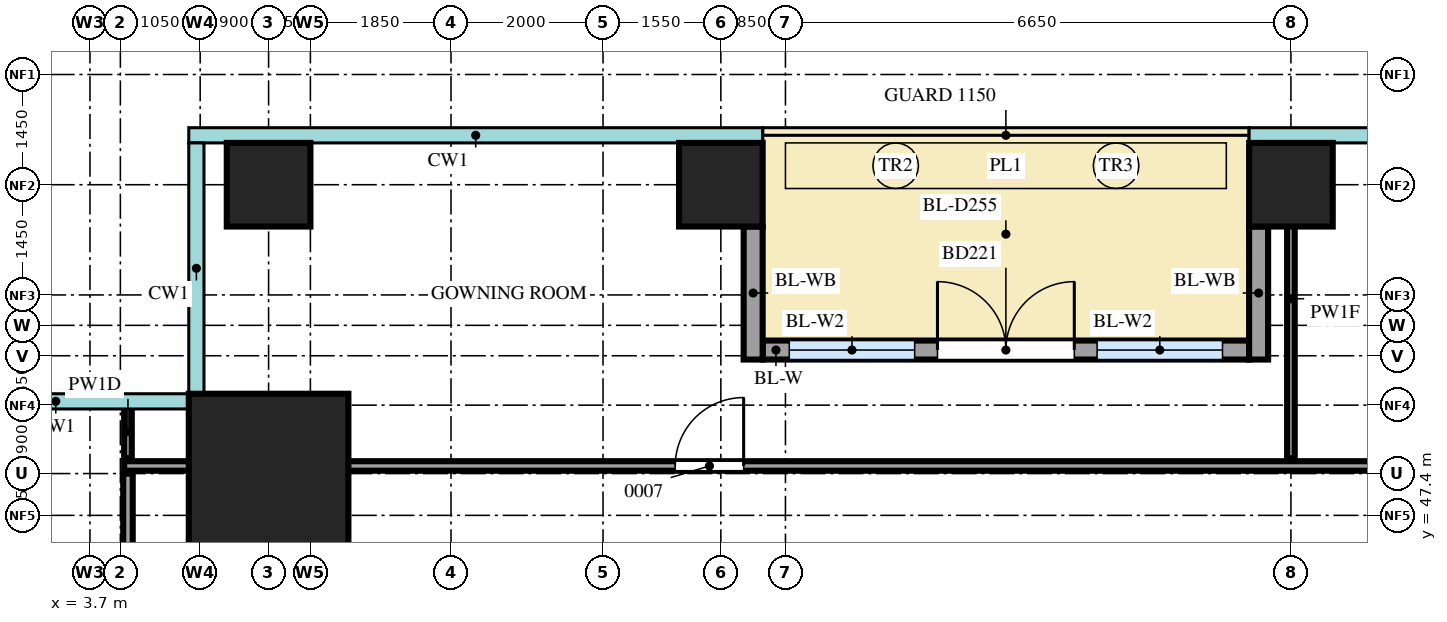
"""IFC4 building model, lengths in metres.
Left out: names, types, materials, properties, quantities, classifications, styles, units other than length and angle.
Written with IfcOpenShell. Run it as: python <this file> out.ifc"""

import sys

from ifc_helpers import new_model, si_unit, direction, frame, frame_2d, origin, origin_2d, place, context, subcontext, project, spatial, rectangle, extrude, source, transform, mapped, element, fill, save


model = new_model("IFC4")
c1 = context("Model", 3, precision=1e-05, world=origin(), true_north=direction((0.0, 1.0)))
c2 = subcontext(c1, "Body", "Model", "MODEL_VIEW")
j1 = project(units=[si_unit("LENGTHUNIT", "METRE"), si_unit("PLANEANGLEUNIT", "RADIAN")], contexts=[c1])
p1 = place(None, origin())
s1 = spatial("IfcSite", under=j1, at=p1, CompositionType="ELEMENT")
p2 = place(p1, origin())
s2 = spatial("IfcBuilding", under=s1, at=p2, CompositionType="ELEMENT")
p3 = place(p2, frame((0.0, 0.0, 105.9)))
s3 = spatial("IfcBuildingStorey", under=s2, at=p3, CompositionType="ELEMENT", Elevation=105.9)
m1 = source(origin(), c2, "Body", "SweptSolid", [
    extrude(rectangle(XDim=2.1, YDim=2.1, at=origin_2d()), origin(), (0.0, 0.0, 1.0), 4.4),
])
p4 = place(p3, frame((6.05, 47.95, 0.0), z_axis=(0.0, 0.0, 1.0), x_axis=(1.0, 0.0, 0.0)))
e1 = element("IfcColumn", 1, at=p4, inside=s3, PredefinedType="COLUMN", context=c2, shape_type="MappedRepresentation", body=[
    mapped(m1, transform((0.0, 0.0, 0.0))),
])
m2 = source(origin(), c2, "Body", "SweptSolid", [
    extrude(rectangle(XDim=1.1, YDim=1.1, at=origin_2d()), origin(), (0.0, 0.0, 1.0), 4.1),
])
for number, where, z_axis, x_axis in (
    (2, (6.05, 51.75, 0.0), (0.0, 0.0, 1.0), (1.0, 0.0, 0.0)),
    (3, (12.0, 51.75, 0.0), (0.0, 0.0, 1.0), (1.0, 0.0, 0.0)),
    (4, (19.5, 51.75, 0.0), (0.0, 0.0, 1.0), (1.0, 0.0, 0.0)),
):
    element("IfcColumn", number, at=place(p3, frame(where, z_axis=z_axis, x_axis=x_axis)), inside=s3, PredefinedType="COLUMN", context=c2, shape_type="MappedRepresentation", body=[
        mapped(m2, transform((0.0, 0.0, 0.0))),
    ])
m3 = source(origin(), c2, "Body", "SweptSolid", [
    extrude(rectangle(XDim=6.4, YDim=0.25, at=frame_2d((3.2, 0.0))), origin(), (0.0, 0.0, 1.0), 4.1),
])
p5 = place(p3, frame((12.55, 49.575, 0.0), z_axis=(0.0, 0.0, 1.0), x_axis=(1.0, 0.0, 0.0)))
e5 = element("IfcWall", 5, at=p5, inside=s3, PredefinedType="SOLIDWALL", context=c2, shape_type="MappedRepresentation", body=[
    mapped(m3, transform((0.0, 0.0, 0.0))),
])
m4 = source(origin(), c2, "Body", "SweptSolid", [
    extrude(rectangle(XDim=1.65, YDim=2.4, at=frame_2d((0.825, 1.2))), frame((0.0, 0.135, 0.0), z_axis=(0.0, -1.0, 0.0), x_axis=(1.0, 0.0, 0.0)), (0.0, 0.0, 1.0), 0.27),
])
p6 = place(p5, frame((0.35, 0.0, 0.0)))
e6 = element("IfcOpeningElement", 6, at=p6, cuts=e5, PredefinedType="OPENING", context=c2, shape_type="MappedRepresentation", body=[
    mapped(m4, transform((0.0, 0.0, 0.0))),
])
p7 = place(p5, frame((4.4, 0.0, 0.0)))
e7 = element("IfcOpeningElement", 7, at=p7, cuts=e5, PredefinedType="OPENING", context=c2, shape_type="MappedRepresentation", body=[
    mapped(m4, transform((0.0, 0.0, 0.0))),
])
m5 = source(origin(), c2, "Body", "SweptSolid", [
    extrude(rectangle(XDim=1.8, YDim=2.4, at=frame_2d((0.9, 1.2))), frame((0.0, 0.135, 0.0), z_axis=(0.0, -1.0, 0.0), x_axis=(1.0, 0.0, 0.0)), (0.0, 0.0, 1.0), 0.27),
])
p8 = place(p5, frame((2.3, 0.0, 0.0)))
e8 = element("IfcOpeningElement", 8, at=p8, cuts=e5, PredefinedType="OPENING", context=c2, shape_type="MappedRepresentation", body=[
    mapped(m5, transform((0.0, 0.0, 0.0))),
])
m6 = source(origin(), c2, "Body", "SweptSolid", [
    extrude(rectangle(XDim=1.75, YDim=0.25, at=frame_2d((0.875, 0.0))), origin(), (0.0, 0.0, 1.0), 3.8),
])
for number, where, z_axis, x_axis in (
    (9, (12.425, 51.2, 0.0), (0.0, 0.0, 1.0), (0.0, -1.0, 0.0)),
    (10, (19.075, 51.2, 0.0), (0.0, 0.0, 1.0), (0.0, -1.0, 0.0)),
):
    element("IfcWall", number, at=place(p3, frame(where, z_axis=z_axis, x_axis=x_axis)), inside=s3, PredefinedType="SOLIDWALL", context=c2, shape_type="MappedRepresentation", body=[
        mapped(m6, transform((0.0, 0.0, 0.0))),
    ])
m7 = source(origin(), c2, "Body", "SweptSolid", [
    extrude(rectangle(XDim=41.8, YDim=0.125, at=frame_2d((20.9, 0.0))), origin(), (0.0, 0.0, 1.0), 4.2),
])
p9 = place(p3, frame((4.2, 6.15, 0.0), z_axis=(0.0, 0.0, 1.0), x_axis=(0.0, 1.0, 0.0)))
e11 = element("IfcWall", 11, at=p9, inside=s3, PredefinedType="PARTITIONING", context=c2, shape_type="MappedRepresentation", body=[
    mapped(m7, transform((0.0, 0.0, 0.0))),
])
m8 = source(origin(), c2, "Body", "SweptSolid", [
    extrude(rectangle(XDim=0.9, YDim=2.1, at=frame_2d((0.45, 1.05))), frame((0.0, 0.073, 0.0), z_axis=(0.0, -1.0, 0.0), x_axis=(1.0, 0.0, 0.0)), (0.0, 0.0, 1.0), 0.145),
])
p10 = place(p9, frame((7.2, 0.0, 0.0)))
e12 = element("IfcOpeningElement", 12, at=p10, cuts=e11, PredefinedType="OPENING", context=c2, shape_type="MappedRepresentation", body=[
    mapped(m8, transform((0.0, 0.0, 0.0))),
])
p11 = place(p9, frame((21.8, 0.0, 0.0)))
e13 = element("IfcOpeningElement", 13, at=p11, cuts=e11, PredefinedType="OPENING", context=c2, shape_type="MappedRepresentation", body=[
    mapped(m8, transform((0.0, 0.0, 0.0))),
])
p12 = place(p9, frame((33.3, 0.0, 0.0)))
e14 = element("IfcOpeningElement", 14, at=p12, cuts=e11, PredefinedType="OPENING", context=c2, shape_type="MappedRepresentation", body=[
    mapped(m8, transform((0.0, 0.0, 0.0))),
])
m9 = source(origin(), c2, "Body", "SweptSolid", [
    extrude(rectangle(XDim=42.2, YDim=0.125, at=frame_2d((21.1, 0.0))), origin(), (0.0, 0.0, 1.0), 3.55),
])
p13 = place(p3, frame((4.15, 48.05, 0.0), z_axis=(0.0, 0.0, 1.0), x_axis=(1.0, 0.0, 0.0)))
e15 = element("IfcWall", 15, at=p13, inside=s3, PredefinedType="PARTITIONING", context=c2, shape_type="MappedRepresentation", body=[
    mapped(m9, transform((0.0, 0.0, 0.0))),
])
p14 = place(p13, frame((7.25, 0.0, 0.0)))
e16 = element("IfcOpeningElement", 16, at=p14, cuts=e15, PredefinedType="OPENING", context=c2, shape_type="MappedRepresentation", body=[
    mapped(m8, transform((0.0, 0.0, 0.0))),
])
m10 = source(origin(), c2, "Body", "SweptSolid", [
    extrude(rectangle(XDim=1.2, YDim=2.1, at=frame_2d((0.6, 1.05))), frame((0.0, 0.073, 0.0), z_axis=(0.0, -1.0, 0.0), x_axis=(1.0, 0.0, 0.0)), (0.0, 0.0, 1.0), 0.145),
])
p15 = place(p13, frame((28.35, 0.0, 0.0)))
e17 = element("IfcOpeningElement", 17, at=p15, cuts=e15, PredefinedType="OPENING", context=c2, shape_type="MappedRepresentation", body=[
    mapped(m10, transform((0.0, 0.0, 0.0))),
])
m11 = source(origin(), c2, "Body", "SweptSolid", [
    extrude(rectangle(XDim=0.7, YDim=0.1, at=frame_2d((0.35, 0.0))), origin(), (0.0, 0.0, 1.0), 4.2),
])
p16 = place(p3, frame((4.2, 48.15, 0.0), z_axis=(0.0, 0.0, 1.0), x_axis=(0.0, 1.0, 0.0)))
e18 = element("IfcWall", 18, at=p16, inside=s3, PredefinedType="PARTITIONING", context=c2, shape_type="MappedRepresentation", body=[
    mapped(m11, transform((0.0, 0.0, 0.0))),
])
m12 = source(origin(), c2, "Body", "SweptSolid", [
    extrude(rectangle(XDim=4.2, YDim=0.1, at=frame_2d((2.1, 0.0))), origin(), (0.0, 0.0, 1.0), 3.77),
])
p17 = place(p3, frame((19.5, 48.15, 0.0), z_axis=(0.0, 0.0, 1.0), x_axis=(0.0, 1.0, 0.0)))
e19 = element("IfcWall", 19, at=p17, inside=s3, PredefinedType="PARTITIONING", context=c2, shape_type="MappedRepresentation", body=[
    mapped(m12, transform((0.0, 0.0, 0.0))),
])
m13 = source(origin(), c2, "Body", "SweptSolid", [
    extrude(rectangle(XDim=1.65, YDim=2.4, at=frame_2d((0.825, 1.2))), frame((0.0, 0.03, 0.0), z_axis=(0.0, -1.0, 0.0), x_axis=(1.0, 0.0, 0.0)), (0.0, 0.0, 1.0), 0.06),
])
p18 = place(p6, origin())
e20 = element("IfcWindow", 20, at=p18, inside=s3, PartitioningType="SINGLE_PANEL", PredefinedType="WINDOW", context=c2, shape_type="MappedRepresentation", body=[
    mapped(m13, transform((0.0, 0.0, 0.0))),
])
fill(e6, e20)
p19 = place(p7, origin())
e21 = element("IfcWindow", 21, at=p19, inside=s3, PartitioningType="SINGLE_PANEL", PredefinedType="WINDOW", context=c2, shape_type="MappedRepresentation", body=[
    mapped(m13, transform((0.0, 0.0, 0.0))),
])
fill(e7, e21)
m14 = source(origin(), c2, "Body", "SweptSolid", [
    extrude(rectangle(XDim=1.8, YDim=2.4, at=frame_2d((0.9, 1.2))), frame((0.0, 0.025, 0.0), z_axis=(0.0, -1.0, 0.0), x_axis=(1.0, 0.0, 0.0)), (0.0, 0.0, 1.0), 0.05),
])
p20 = place(p8, origin())
e22 = element("IfcDoor", 22, at=p20, inside=s3, OperationType="DOUBLE_DOOR_DOUBLE_SWING", PredefinedType="DOOR", context=c2, shape_type="MappedRepresentation", body=[
    mapped(m14, transform((0.0, 0.0, 0.0))),
])
fill(e8, e22)
m15 = source(origin(), c2, "Body", "SweptSolid", [
    extrude(rectangle(XDim=0.9, YDim=2.1, at=frame_2d((0.45, 1.05))), frame((0.0, 0.025, 0.0), z_axis=(0.0, -1.0, 0.0), x_axis=(1.0, 0.0, 0.0)), (0.0, 0.0, 1.0), 0.05),
])
p21 = place(p14, origin())
e23 = element("IfcDoor", 23, at=p21, inside=s3, OperationType="SINGLE_SWING_LEFT", PredefinedType="DOOR", context=c2, shape_type="MappedRepresentation", body=[
    mapped(m15, transform((0.0, 0.0, 0.0))),
])
fill(e16, e23)
save(model, sys.argv[1])
